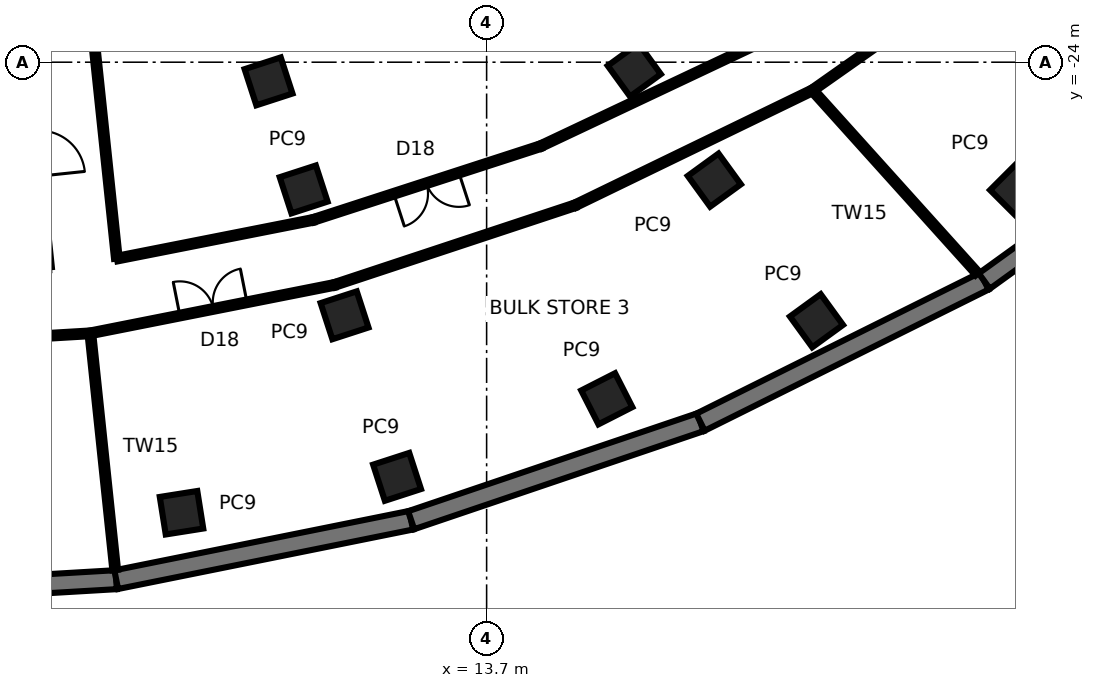
"""IFC4 building model, lengths in metres.
Left out: names, types, materials, properties, quantities, classifications, styles, units other than length and angle.
Written with IfcOpenShell. Run it as: python <this file> out.ifc"""

import sys

from ifc_helpers import new_model, si_unit, direction, frame, frame_2d, origin, origin_2d, place, context, subcontext, project, spatial, rectangle, extrude, element, fill, save


model = new_model("IFC4")
c1 = context("Model", 3, precision=1e-05, world=origin(), true_north=direction((0.0, 1.0)))
c2 = subcontext(c1, "Body", "Model", "MODEL_VIEW")
j1 = project(units=[si_unit("LENGTHUNIT", "METRE"), si_unit("PLANEANGLEUNIT", "RADIAN")], contexts=[c1])
p1 = place(None, origin())
s1 = spatial("IfcSite", under=j1, at=p1, CompositionType="ELEMENT")
p2 = place(p1, origin())
s2 = spatial("IfcBuilding", under=s1, at=p2, CompositionType="ELEMENT")
p3 = place(p2, frame((0.0, 0.0, -5.0)))
s3 = spatial("IfcBuildingStorey", under=s2, at=p3, CompositionType="ELEMENT", Elevation=-5.0)
p4 = place(p3, frame((-4.003, -38.085, -0.15), z_axis=(0.0, 0.0, 1.0), x_axis=(0.998274478799, 0.058720226323, 0.0)))
e1 = element("IfcWall", 1, at=p4, inside=s3, PredefinedType="SOLIDWALL", context=c2, shape_type="SweptSolid", body=[
    extrude(rectangle(XDim=7.97, YDim=0.5, at=frame_2d((3.985, 0.0))), origin(), (0.0, 0.0, 1.0), 4.95),
])
p5 = place(p3, frame((3.954, -37.617, -0.15), z_axis=(0.0, 0.0, 1.0), x_axis=(0.980279440506, 0.197616341736, 0.0)))
e2 = element("IfcWall", 2, at=p5, inside=s3, PredefinedType="SOLIDWALL", context=c2, shape_type="SweptSolid", body=[
    extrude(rectangle(XDim=7.917, YDim=0.5, at=frame_2d((3.958, 0.0))), origin(), (0.0, 0.0, 1.0), 4.95),
])
p6 = place(p3, frame((11.714, -36.053, -0.15), z_axis=(0.0, 0.0, 1.0), x_axis=(0.94711032906, 0.320908124838, 0.0)))
e3 = element("IfcWall", 3, at=p6, inside=s3, PredefinedType="SOLIDWALL", context=c2, shape_type="SweptSolid", body=[
    extrude(rectangle(XDim=8.037, YDim=0.5, at=frame_2d((4.019, 0.0))), origin(), (0.0, 0.0, 1.0), 4.95),
])
p7 = place(p3, frame((19.326, -33.474, -0.15), z_axis=(0.0, 0.0, 1.0), x_axis=(0.895437485693, 0.44518727432, 0.0)))
e4 = element("IfcWall", 4, at=p7, inside=s3, PredefinedType="SOLIDWALL", context=c2, shape_type="SweptSolid", body=[
    extrude(rectangle(XDim=8.342, YDim=0.5, at=frame_2d((4.171, 0.0))), origin(), (0.0, 0.0, 1.0), 4.95),
])
p8 = place(p3, frame((26.796, -29.76, -0.15), z_axis=(0.0, 0.0, 1.0), x_axis=(0.810809240523, 0.585310494937, 0.0)))
e5 = element("IfcWall", 5, at=p8, inside=s3, PredefinedType="SOLIDWALL", context=c2, shape_type="SweptSolid", body=[
    extrude(rectangle(XDim=8.763, YDim=0.5, at=frame_2d((4.382, 0.0))), origin(), (0.0, 0.0, 1.0), 4.95),
])
for number, where, z_axis, x_axis in (
    (6, (5.672, -35.856, -0.15), (0.0, 0.0, 1.0), (0.156, -0.988, 0.0)),
    (7, (11.344, -34.911, -0.15), (0.0, 0.0, 1.0), (0.309, -0.951, 0.0)),
    (8, (16.862, -32.857, -0.15), (0.0, 0.0, 1.0), (0.454, -0.891, 0.0)),
    (9, (22.38, -30.803, -0.15), (0.0, 0.0, 1.0), (0.588, -0.809, 0.0)),
    (10, (27.655, -27.364, -0.15), (0.0, 0.0, 1.0), (0.707, -0.707, 0.0)),
    (11, (9.962, -30.66, -0.15), (0.0, 0.0, 1.0), (0.309, -0.951, 0.0)),
    (12, (19.692, -27.103, -0.15), (0.0, 0.0, 1.0), (0.588, -0.809, 0.0)),
    (13, (8.886, -27.347, -0.15), (0.0, 0.0, 1.0), (0.309, -0.951, 0.0)),
    (14, (17.585, -24.204, -0.15), (0.0, 0.0, 1.0), (0.588, -0.809, 0.0)),
    (15, (7.962, -24.504, -0.15), (0.0, 0.0, 1.0), (0.309, -0.951, 0.0)),
):
    element("IfcColumn", number, at=place(p3, frame(where, z_axis=z_axis, x_axis=x_axis)), inside=s3, PredefinedType="COLUMN", context=c2, shape_type="SweptSolid", body=[
        extrude(rectangle(XDim=1.0, YDim=1.0, at=origin_2d()), origin(), (0.0, 0.0, 1.0), 5.15),
    ])
p9 = place(p3, frame((-3.313, -31.525, 0.0), z_axis=(0.0, 0.0, 1.0), x_axis=(0.998243483958, 0.059244803448, 0.0)))
e16 = element("IfcWall", 16, at=p9, inside=s3, PredefinedType="PARTITIONING", context=c2, shape_type="SweptSolid", body=[
    extrude(rectangle(XDim=6.597, YDim=0.15, at=frame_2d((3.299, 0.0))), origin(), (0.0, 0.0, 1.0), 4.8),
])
p10 = place(p3, frame((3.272, -31.135, 0.0), z_axis=(0.0, 0.0, 1.0), x_axis=(0.10452654069, -0.994522097437, 0.0)))
e17 = element("IfcWall", 17, at=p10, inside=s3, PredefinedType="PARTITIONING", context=c2, shape_type="SweptSolid", body=[
    extrude(rectangle(XDim=6.264, YDim=0.15, at=frame_2d((3.132, 0.0))), origin(), (0.0, 0.0, 1.0), 4.8),
])
p11 = place(p3, frame((3.971, -29.169, 0.0), z_axis=(0.0, 0.0, 1.0), x_axis=(-0.104531296456, 0.994521597584, 0.0)))
e18 = element("IfcWall", 18, at=p11, inside=s3, PredefinedType="PARTITIONING", context=c2, shape_type="SweptSolid", body=[
    extrude(rectangle(XDim=17.968, YDim=0.15, at=frame_2d((8.984, 0.0))), origin(), (0.0, 0.0, 1.0), 4.8),
])
p12 = place(p11, frame((11.664, 0.0, 0.0)))
e19 = element("IfcOpeningElement", 19, at=p12, cuts=e18, PredefinedType="OPENING", context=c2, shape_type="SweptSolid", body=[
    extrude(rectangle(XDim=1.8, YDim=2.4, at=frame_2d((0.9, 1.2))), frame((0.0, 0.085, 0.0), z_axis=(0.0, -1.0, 0.0), x_axis=(1.0, 0.0, 0.0)), (0.0, 0.0, 1.0), 0.17),
])
p13 = place(p3, frame((3.272, -31.135, 0.0), z_axis=(0.0, 0.0, 1.0), x_axis=(0.980908787451, 0.194468379696, 0.0)))
e20 = element("IfcWall", 20, at=p13, inside=s3, PredefinedType="PARTITIONING", context=c2, shape_type="SweptSolid", body=[
    extrude(rectangle(XDim=6.555, YDim=0.15, at=frame_2d((3.277, 0.0))), origin(), (0.0, 0.0, 1.0), 4.8),
])
p14 = place(p13, frame((2.402, 0.0, 0.0)))
e21 = element("IfcOpeningElement", 21, at=p14, cuts=e20, PredefinedType="OPENING", context=c2, shape_type="SweptSolid", body=[
    extrude(rectangle(XDim=1.8, YDim=2.4, at=frame_2d((0.9, 1.2))), frame((0.0, 0.085, 0.0), z_axis=(0.0, -1.0, 0.0), x_axis=(1.0, 0.0, 0.0)), (0.0, 0.0, 1.0), 0.17),
])
p15 = place(p3, frame((9.146, -28.148, 0.0), z_axis=(0.0, 0.0, 1.0), x_axis=(-0.98107946534, -0.193605482074, 0.0)))
e22 = element("IfcWall", 22, at=p15, inside=s3, PredefinedType="PARTITIONING", context=c2, shape_type="SweptSolid", body=[
    extrude(rectangle(XDim=5.275, YDim=0.15, at=frame_2d((2.637, 0.0))), origin(), (0.0, 0.0, 1.0), 4.8),
])
p16 = place(p3, frame((9.702, -29.86, 0.0), z_axis=(0.0, 0.0, 1.0), x_axis=(0.949329573652, 0.314282294426, 0.0)))
e23 = element("IfcWall", 23, at=p16, inside=s3, PredefinedType="PARTITIONING", context=c2, shape_type="SweptSolid", body=[
    extrude(rectangle(XDim=6.666, YDim=0.15, at=frame_2d((3.333, 0.0))), origin(), (0.0, 0.0, 1.0), 4.8),
])
p17 = place(p3, frame((15.13, -26.206, 0.0), z_axis=(0.0, 0.0, 1.0), x_axis=(-0.951171714446, -0.308662225805, 0.0)))
e24 = element("IfcWall", 24, at=p17, inside=s3, PredefinedType="PARTITIONING", context=c2, shape_type="SweptSolid", body=[
    extrude(rectangle(XDim=6.291, YDim=0.15, at=frame_2d((3.146, 0.0))), origin(), (0.0, 0.0, 1.0), 4.8),
])
p18 = place(p17, frame((2.271, 0.0, 0.0)))
e25 = element("IfcOpeningElement", 25, at=p18, cuts=e24, PredefinedType="OPENING", context=c2, shape_type="SweptSolid", body=[
    extrude(rectangle(XDim=1.8, YDim=2.4, at=frame_2d((0.9, 1.2))), frame((0.0, 0.085, 0.0), z_axis=(0.0, -1.0, 0.0), x_axis=(1.0, 0.0, 0.0)), (0.0, 0.0, 1.0), 0.17),
])
p19 = place(p3, frame((16.03, -27.765, 0.0), z_axis=(0.0, 0.0, 1.0), x_axis=(0.899868927616, 0.436160421303, 0.0)))
e26 = element("IfcWall", 26, at=p19, inside=s3, PredefinedType="PARTITIONING", context=c2, shape_type="SweptSolid", body=[
    extrude(rectangle(XDim=6.939, YDim=0.15, at=frame_2d((3.47, 0.0))), origin(), (0.0, 0.0, 1.0), 4.8),
])
p20 = place(p3, frame((21.07, -23.401, 0.0), z_axis=(0.0, 0.0, 1.0), x_axis=(-0.90422911436, -0.427047665657, 0.0)))
e27 = element("IfcWall", 27, at=p20, inside=s3, PredefinedType="PARTITIONING", context=c2, shape_type="SweptSolid", body=[
    extrude(rectangle(XDim=6.569, YDim=0.15, at=frame_2d((3.285, 0.0))), origin(), (0.0, 0.0, 1.0), 4.8),
])
p21 = place(p3, frame((26.62, -29.565, 0.0), z_axis=(0.0, 0.0, 1.0), x_axis=(-0.669128788744, 0.743146462061, 0.0)))
e28 = element("IfcWall", 28, at=p21, inside=s3, PredefinedType="PARTITIONING", context=c2, shape_type="SweptSolid", body=[
    extrude(rectangle(XDim=6.495, YDim=0.15, at=frame_2d((3.247, 0.0))), origin(), (0.0, 0.0, 1.0), 4.8),
])
p22 = place(p3, frame((22.274, -24.738, 0.0), z_axis=(0.0, 0.0, 1.0), x_axis=(0.817737752459, 0.575590973003, 0.0)))
e29 = element("IfcWall", 29, at=p22, inside=s3, PredefinedType="PARTITIONING", context=c2, shape_type="SweptSolid", body=[
    extrude(rectangle(XDim=7.314, YDim=0.15, at=frame_2d((3.657, 0.0))), origin(), (0.0, 0.0, 1.0), 4.8),
])
p23 = place(p18, origin())
e30 = element("IfcDoor", 30, at=p23, inside=s3, OperationType="DOUBLE_DOOR_SINGLE_SWING", PredefinedType="DOOR", context=c2, shape_type="SweptSolid", body=[
    extrude(rectangle(XDim=1.8, YDim=2.4, at=frame_2d((0.9, 1.2))), frame((0.0, 0.025, 0.0), z_axis=(0.0, -1.0, 0.0), x_axis=(1.0, 0.0, 0.0)), (0.0, 0.0, 1.0), 0.05),
])
fill(e25, e30)
p24 = place(p14, origin())
e31 = element("IfcDoor", 31, at=p24, inside=s3, OperationType="DOUBLE_DOOR_SINGLE_SWING", PredefinedType="DOOR", context=c2, shape_type="SweptSolid", body=[
    extrude(rectangle(XDim=1.8, YDim=2.4, at=frame_2d((0.9, 1.2))), frame((0.0, 0.025, 0.0), z_axis=(0.0, -1.0, 0.0), x_axis=(1.0, 0.0, 0.0)), (0.0, 0.0, 1.0), 0.05),
])
fill(e21, e31)
save(model, sys.argv[1])
